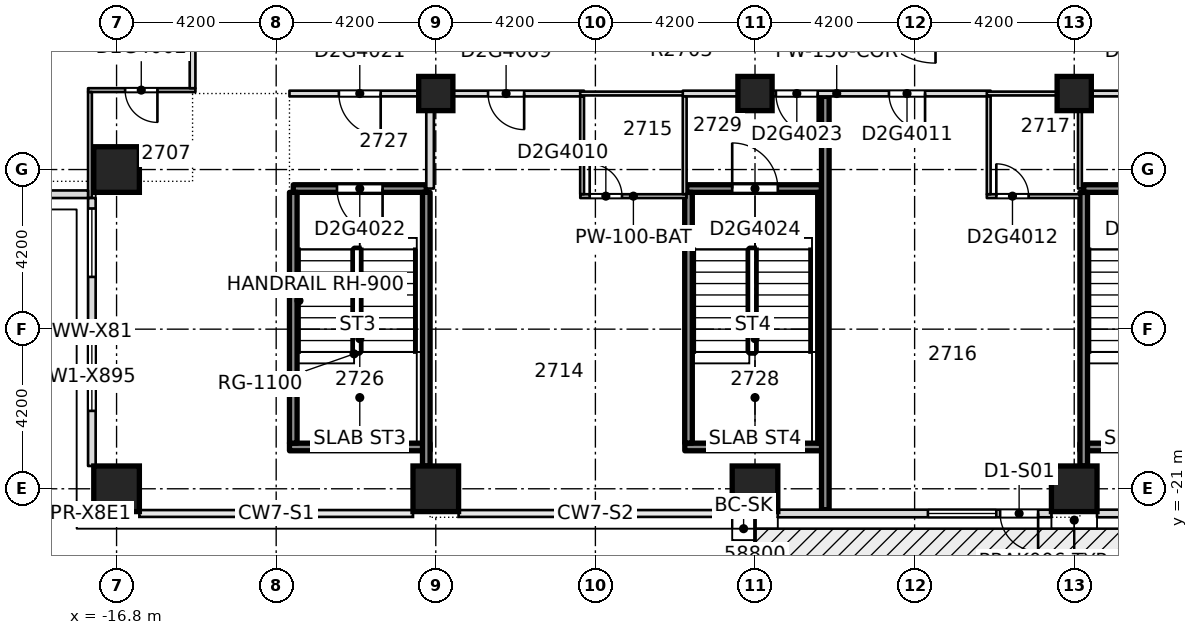
"""IFC4 building model, lengths in metres.
Left out: names, types, materials, properties, quantities, classifications, styles, units other than length and angle.
Written with IfcOpenShell. Run it as: python <this file> out.ifc"""

import sys

from ifc_helpers import new_model, si_unit, direction, frame, frame_2d, origin, origin_2d, place, context, subcontext, project, spatial, rectangle, extrude, element, fill, save


model = new_model("IFC4")
c1 = context("Model", 3, precision=1e-05, world=origin(), true_north=direction((0.0, 1.0)))
c2 = subcontext(c1, "Body", "Model", "MODEL_VIEW")
j1 = project(units=[si_unit("LENGTHUNIT", "METRE"), si_unit("PLANEANGLEUNIT", "RADIAN")], contexts=[c1])
p1 = place(None, origin())
s1 = spatial("IfcSite", under=j1, at=p1, CompositionType="ELEMENT")
p2 = place(p1, origin())
s2 = spatial("IfcBuilding", under=s1, at=p2, CompositionType="ELEMENT")
p3 = place(p2, frame((0.0, 0.0, 108.0)))
s3 = spatial("IfcBuildingStorey", under=s2, at=p3, CompositionType="ELEMENT", Elevation=108.0)
for number, where, z_axis, x_axis in (
    (1, (-16.8, -21.0, -0.32), (0.0, 0.0, 1.0), (1.0, 0.0, 0.0)),
    (2, (-8.4, -21.0, -0.32), (0.0, 0.0, 1.0), (1.0, 0.0, 0.0)),
    (3, (0.0, -21.0, -0.32), (0.0, 0.0, 1.0), (1.0, 0.0, 0.0)),
    (4, (8.4, -21.0, -0.32), (0.0, 0.0, 1.0), (1.0, 0.0, 0.0)),
    (5, (-16.8, -12.6, -0.32), (0.0, 0.0, 1.0), (1.0, 0.0, 0.0)),
):
    element("IfcColumn", number, at=place(p3, frame(where, z_axis=z_axis, x_axis=x_axis)), inside=s3, PredefinedType="COLUMN", context=c2, shape_type="SweptSolid", body=[
        extrude(rectangle(XDim=1.2, YDim=1.2, at=origin_2d()), origin(), (0.0, 0.0, 1.0), 3.45),
    ])
for number, where, z_axis, x_axis in (
    (6, (-8.4, -10.6, -0.32), (0.0, 0.0, 1.0), (1.0, 0.0, 0.0)),
    (7, (0.0, -10.6, -0.32), (0.0, 0.0, 1.0), (1.0, 0.0, 0.0)),
    (8, (8.4, -10.6, -0.32), (0.0, 0.0, 1.0), (1.0, 0.0, 0.0)),
):
    element("IfcColumn", number, at=place(p3, frame(where, z_axis=z_axis, x_axis=x_axis)), inside=s3, PredefinedType="COLUMN", context=c2, shape_type="SweptSolid", body=[
        extrude(rectangle(XDim=0.9, YDim=0.9, at=origin_2d()), origin(), (0.0, 0.0, 1.0), 3.45),
    ])
p4 = place(p3, frame((-1.848, -19.9, 0.0), z_axis=(0.0, 0.0, 1.0), x_axis=(1.0, 0.0, 0.0)))
e9 = element("IfcWall", 9, at=p4, inside=s3, PredefinedType="SOLIDWALL", context=c2, shape_type="SweptSolid", body=[
    extrude(rectangle(XDim=3.696, YDim=0.2, at=frame_2d((1.848, 0.0))), origin(), (0.0, 0.0, 1.0), 3.13),
])
p5 = place(p3, frame((-4.598, -13.3, 0.0), z_axis=(0.0, 0.0, 1.0), x_axis=(1.0, 0.0, 0.0)))
e10 = element("IfcWall", 10, at=p5, inside=s3, PredefinedType="PARTITIONING", context=c2, shape_type="SweptSolid", body=[
    extrude(rectangle(XDim=2.796, YDim=0.1, at=frame_2d((1.398, 0.0))), origin(), (0.0, 0.0, 1.0), 3.13),
])
p6 = place(p5, frame((0.248, 0.0, 0.0)))
e11 = element("IfcOpeningElement", 11, at=p6, cuts=e10, PredefinedType="OPENING", context=c2, shape_type="SweptSolid", body=[
    extrude(rectangle(XDim=0.85, YDim=2.1, at=frame_2d((0.425, 1.05))), frame((0.0, 0.06, 0.0), z_axis=(0.0, -1.0, 0.0), x_axis=(1.0, 0.0, 0.0)), (0.0, 0.0, 1.0), 0.12),
])
p7 = place(p3, frame((6.1, -13.3, 0.0), z_axis=(0.0, 0.0, 1.0), x_axis=(1.0, 0.0, 0.0)))
e12 = element("IfcWall", 12, at=p7, inside=s3, PredefinedType="PARTITIONING", context=c2, shape_type="SweptSolid", body=[
    extrude(rectangle(XDim=2.45, YDim=0.1, at=frame_2d((1.225, 0.0))), origin(), (0.0, 0.0, 1.0), 3.13),
])
p8 = place(p7, frame((0.25, 0.0, 0.0)))
e13 = element("IfcOpeningElement", 13, at=p8, cuts=e12, PredefinedType="OPENING", context=c2, shape_type="SweptSolid", body=[
    extrude(rectangle(XDim=0.85, YDim=2.1, at=frame_2d((0.425, 1.05))), frame((0.0, 0.06, 0.0), z_axis=(0.0, -1.0, 0.0), x_axis=(1.0, 0.0, 0.0)), (0.0, 0.0, 1.0), 0.12),
])
p9 = place(p3, frame((-12.15, -13.1, 0.0), z_axis=(0.0, 0.0, 1.0), x_axis=(1.0, 0.0, 0.0)))
e14 = element("IfcWall", 14, at=p9, inside=s3, PredefinedType="SOLIDWALL", context=c2, shape_type="SweptSolid", body=[
    extrude(rectangle(XDim=3.5, YDim=0.2, at=frame_2d((1.75, 0.0))), origin(), (0.0, 0.0, 1.0), 3.13),
])
p10 = place(p9, frame((1.15, 0.0, 0.0)))
e15 = element("IfcOpeningElement", 15, at=p10, cuts=e14, PredefinedType="OPENING", context=c2, shape_type="SweptSolid", body=[
    extrude(rectangle(XDim=1.2, YDim=2.1, at=frame_2d((0.6, 1.05))), frame((0.0, 0.11, 0.0), z_axis=(0.0, -1.0, 0.0), x_axis=(1.0, 0.0, 0.0)), (0.0, 0.0, 1.0), 0.22),
])
p11 = place(p3, frame((-1.798, -13.1, 0.0), z_axis=(0.0, 0.0, 1.0), x_axis=(1.0, 0.0, 0.0)))
e16 = element("IfcWall", 16, at=p11, inside=s3, PredefinedType="SOLIDWALL", context=c2, shape_type="SweptSolid", body=[
    extrude(rectangle(XDim=3.546, YDim=0.2, at=frame_2d((1.773, 0.0))), origin(), (0.0, 0.0, 1.0), 3.13),
])
p12 = place(p11, frame((1.198, 0.0, 0.0)))
e17 = element("IfcOpeningElement", 17, at=p12, cuts=e16, PredefinedType="OPENING", context=c2, shape_type="SweptSolid", body=[
    extrude(rectangle(XDim=1.2, YDim=2.1, at=frame_2d((0.6, 1.05))), frame((0.0, 0.11, 0.0), z_axis=(0.0, -1.0, 0.0), x_axis=(1.0, 0.0, 0.0)), (0.0, 0.0, 1.0), 0.22),
])
p13 = place(p3, frame((8.65, -13.1, 0.0), z_axis=(0.0, 0.0, 1.0), x_axis=(1.0, 0.0, 0.0)))
e18 = element("IfcWall", 18, at=p13, inside=s3, PredefinedType="SOLIDWALL", context=c2, shape_type="SweptSolid", body=[
    extrude(rectangle(XDim=3.5, YDim=0.2, at=frame_2d((1.75, 0.0))), origin(), (0.0, 0.0, 1.0), 3.13),
])
p14 = place(p13, frame((1.15, 0.0, 0.0)))
e19 = element("IfcOpeningElement", 19, at=p14, cuts=e18, PredefinedType="OPENING", context=c2, shape_type="SweptSolid", body=[
    extrude(rectangle(XDim=1.2, YDim=2.1, at=frame_2d((0.6, 1.05))), frame((0.0, 0.11, 0.0), z_axis=(0.0, -1.0, 0.0), x_axis=(1.0, 0.0, 0.0)), (0.0, 0.0, 1.0), 0.22),
])
p15 = place(p3, frame((-12.25, -10.6, 0.0), z_axis=(0.0, 0.0, 1.0), x_axis=(1.0, 0.0, 0.0)))
e20 = element("IfcWall", 20, at=p15, inside=s3, PredefinedType="PARTITIONING", context=c2, shape_type="SweptSolid", body=[
    extrude(rectangle(XDim=7.75, YDim=0.15, at=frame_2d((3.875, 0.0))), origin(), (0.0, 0.0, 1.0), 3.13),
])
p16 = place(p15, frame((5.225, 0.0, 0.0)))
e21 = element("IfcOpeningElement", 21, at=p16, cuts=e20, PredefinedType="OPENING", context=c2, shape_type="SweptSolid", body=[
    extrude(rectangle(XDim=0.95, YDim=2.1, at=frame_2d((0.475, 1.05))), frame((0.0, 0.085, 0.0), z_axis=(0.0, -1.0, 0.0), x_axis=(1.0, 0.0, 0.0)), (0.0, 0.0, 1.0), 0.17),
])
p17 = place(p15, frame((1.3, 0.0, 0.0)))
e22 = element("IfcOpeningElement", 22, at=p17, cuts=e20, PredefinedType="OPENING", context=c2, shape_type="SweptSolid", body=[
    extrude(rectangle(XDim=1.1, YDim=2.1, at=frame_2d((0.55, 1.05))), frame((0.0, 0.085, 0.0), z_axis=(0.0, -1.0, 0.0), x_axis=(1.0, 0.0, 0.0)), (0.0, 0.0, 1.0), 0.17),
])
p18 = place(p3, frame((-4.6, -10.6, 0.0), z_axis=(0.0, 0.0, 1.0), x_axis=(1.0, 0.0, 0.0)))
e23 = element("IfcWall", 23, at=p18, inside=s3, PredefinedType="PARTITIONING", context=c2, shape_type="SweptSolid", body=[
    extrude(rectangle(XDim=2.8, YDim=0.1, at=frame_2d((1.4, 0.0))), origin(), (0.0, 0.0, 1.0), 3.13),
])
p19 = place(p3, frame((-1.9, -10.6, 0.0), z_axis=(0.0, 0.0, 1.0), x_axis=(1.0, 0.0, 0.0)))
e24 = element("IfcWall", 24, at=p19, inside=s3, PredefinedType="PARTITIONING", context=c2, shape_type="SweptSolid", body=[
    extrude(rectangle(XDim=8.1, YDim=0.15, at=frame_2d((4.05, 0.0))), origin(), (0.0, 0.0, 1.0), 3.13),
])
p20 = place(p19, frame((5.425, 0.0, 0.0)))
e25 = element("IfcOpeningElement", 25, at=p20, cuts=e24, PredefinedType="OPENING", context=c2, shape_type="SweptSolid", body=[
    extrude(rectangle(XDim=0.95, YDim=2.1, at=frame_2d((0.475, 1.05))), frame((0.0, 0.085, 0.0), z_axis=(0.0, -1.0, 0.0), x_axis=(1.0, 0.0, 0.0)), (0.0, 0.0, 1.0), 0.17),
])
p21 = place(p19, frame((2.45, 0.0, 0.0)))
e26 = element("IfcOpeningElement", 26, at=p21, cuts=e24, PredefinedType="OPENING", context=c2, shape_type="SweptSolid", body=[
    extrude(rectangle(XDim=1.1, YDim=2.1, at=frame_2d((0.55, 1.05))), frame((0.0, 0.085, 0.0), z_axis=(0.0, -1.0, 0.0), x_axis=(1.0, 0.0, 0.0)), (0.0, 0.0, 1.0), 0.17),
])
p22 = place(p3, frame((6.1, -10.6, 0.0), z_axis=(0.0, 0.0, 1.0), x_axis=(1.0, 0.0, 0.0)))
e27 = element("IfcWall", 27, at=p22, inside=s3, PredefinedType="PARTITIONING", context=c2, shape_type="SweptSolid", body=[
    extrude(rectangle(XDim=2.5, YDim=0.1, at=frame_2d((1.25, 0.0))), origin(), (0.0, 0.0, 1.0), 3.13),
])
p23 = place(p3, frame((8.5, -10.6, 0.0), z_axis=(0.0, 0.0, 1.0), x_axis=(1.0, 0.0, 0.0)))
e28 = element("IfcWall", 28, at=p23, inside=s3, PredefinedType="PARTITIONING", context=c2, shape_type="SweptSolid", body=[
    extrude(rectangle(XDim=3.75, YDim=0.15, at=frame_2d((1.875, 0.0))), origin(), (0.0, 0.0, 1.0), 3.13),
])
p24 = place(p23, frame((1.35, 0.0, 0.0)))
e29 = element("IfcOpeningElement", 29, at=p24, cuts=e28, PredefinedType="OPENING", context=c2, shape_type="SweptSolid", body=[
    extrude(rectangle(XDim=1.1, YDim=2.1, at=frame_2d((0.55, 1.05))), frame((0.0, 0.085, 0.0), z_axis=(0.0, -1.0, 0.0), x_axis=(1.0, 0.0, 0.0)), (0.0, 0.0, 1.0), 0.17),
])
p25 = place(p3, frame((-17.55, -10.51, 0.0), z_axis=(0.0, 0.0, 1.0), x_axis=(1.0, 0.0, 0.0)))
e30 = element("IfcWall", 30, at=p25, inside=s3, PredefinedType="PARTITIONING", context=c2, shape_type="SweptSolid", body=[
    extrude(rectangle(XDim=2.825, YDim=0.1, at=frame_2d((1.413, 0.0))), origin(), (0.0, 0.0, 1.0), 3.13),
])
p26 = place(p25, frame((0.975, 0.0, 0.0)))
e31 = element("IfcOpeningElement", 31, at=p26, cuts=e30, PredefinedType="OPENING", context=c2, shape_type="SweptSolid", body=[
    extrude(rectangle(XDim=0.85, YDim=2.1, at=frame_2d((0.425, 1.05))), frame((0.0, 0.06, 0.0), z_axis=(0.0, -1.0, 0.0), x_axis=(1.0, 0.0, 0.0)), (0.0, 0.0, 1.0), 0.12),
])
p27 = place(p3, frame((-17.5, -13.35, 0.0), z_axis=(0.0, 0.0, 1.0), x_axis=(0.0, 1.0, 0.0)))
e32 = element("IfcWall", 32, at=p27, inside=s3, PredefinedType="PARTITIONING", context=c2, shape_type="SweptSolid", body=[
    extrude(rectangle(XDim=2.79, YDim=0.1, at=frame_2d((1.395, 0.0))), origin(), (0.0, 0.0, 1.0), 3.13),
])
p28 = place(p3, frame((-14.8, -10.46, 0.0), z_axis=(0.0, 0.0, 1.0), x_axis=(0.0, 1.0, 0.0)))
e33 = element("IfcWall", 33, at=p28, inside=s3, PredefinedType="PARTITIONING", context=c2, shape_type="SweptSolid", body=[
    extrude(rectangle(XDim=2.985, YDim=0.15, at=frame_2d((1.492, 0.0))), origin(), (0.0, 0.0, 1.0), 3.13),
])
p29 = place(p3, frame((-8.55, -13.1, 0.0), z_axis=(0.0, 0.0, 1.0), x_axis=(0.0, 1.0, 0.0)))
e34 = element("IfcWall", 34, at=p29, inside=s3, PredefinedType="PARTITIONING", context=c2, shape_type="SweptSolid", body=[
    extrude(rectangle(XDim=2.425, YDim=0.2, at=frame_2d((1.212, 0.0))), origin(), (0.0, 0.0, 1.0), 3.13),
])
for number, where, z_axis, x_axis in (
    (35, (-4.55, -13.248, 0.0), (0.0, 0.0, 1.0), (0.0, 1.0, 0.0)),
    (36, (-1.85, -13.248, 0.0), (0.0, 0.0, 1.0), (0.0, 1.0, 0.0)),
):
    element("IfcWall", number, at=place(p3, frame(where, z_axis=z_axis, x_axis=x_axis)), inside=s3, PredefinedType="PARTITIONING", context=c2, shape_type="SweptSolid", body=[
        extrude(rectangle(XDim=2.573, YDim=0.1, at=frame_2d((1.287, 0.0))), origin(), (0.0, 0.0, 1.0), 3.13),
    ])
for number, where, z_axis, x_axis in (
    (37, (-1.75, -19.798, 0.0), (0.0, 0.0, 1.0), (0.0, 1.0, 0.0)),
    (38, (1.75, -19.798, 0.0), (0.0, 0.0, 1.0), (0.0, 1.0, 0.0)),
):
    element("IfcWall", number, at=place(p3, frame(where, z_axis=z_axis, x_axis=x_axis)), inside=s3, PredefinedType="SOLIDWALL", context=c2, shape_type="SweptSolid", body=[
        extrude(rectangle(XDim=6.596, YDim=0.2, at=frame_2d((3.298, 0.0))), origin(), (0.0, 0.0, 1.0), 3.13),
    ])
p30 = place(p3, frame((6.15, -13.25, 0.0), z_axis=(0.0, 0.0, 1.0), x_axis=(0.0, 1.0, 0.0)))
e39 = element("IfcWall", 39, at=p30, inside=s3, PredefinedType="PARTITIONING", context=c2, shape_type="SweptSolid", body=[
    extrude(rectangle(XDim=2.575, YDim=0.1, at=frame_2d((1.288, 0.0))), origin(), (0.0, 0.0, 1.0), 3.13),
])
p31 = place(p3, frame((8.55, -13.1, 0.0), z_axis=(0.0, 0.0, 1.0), x_axis=(0.0, 1.0, 0.0)))
e40 = element("IfcWall", 40, at=p31, inside=s3, PredefinedType="PARTITIONING", context=c2, shape_type="SweptSolid", body=[
    extrude(rectangle(XDim=2.425, YDim=0.1, at=frame_2d((1.212, 0.0))), origin(), (0.0, 0.0, 1.0), 3.13),
])
p32 = place(p3, frame((0.6, -21.65, 0.0), z_axis=(0.0, 0.0, 1.0), x_axis=(1.0, 0.0, 0.0)))
e41 = element("IfcWall", 41, at=p32, inside=s3, PredefinedType="STANDARD", context=c2, shape_type="SweptSolid", body=[
    extrude(rectangle(XDim=7.2, YDim=0.2, at=frame_2d((3.6, 0.0))), origin(), (0.0, 0.0, 1.0), 3.13),
])
p33 = place(p32, frame((3.95, 0.0, 0.2)))
e42 = element("IfcOpeningElement", 42, at=p33, cuts=e41, PredefinedType="OPENING", context=c2, shape_type="SweptSolid", body=[
    extrude(rectangle(XDim=1.8, YDim=2.65, at=frame_2d((0.9, 1.325))), frame((0.0, 0.11, 0.0), z_axis=(0.0, -1.0, 0.0), x_axis=(1.0, 0.0, 0.0)), (0.0, 0.0, 1.0), 0.22),
])
p34 = place(p32, frame((5.85, 0.0, 0.0)))
e43 = element("IfcOpeningElement", 43, at=p34, cuts=e41, PredefinedType="OPENING", context=c2, shape_type="SweptSolid", body=[
    extrude(rectangle(XDim=1.0, YDim=2.4, at=frame_2d((0.5, 1.2))), frame((0.0, 0.11, 0.0), z_axis=(0.0, -1.0, 0.0), x_axis=(1.0, 0.0, 0.0)), (0.0, 0.0, 1.0), 0.22),
])
p35 = place(p3, frame((9.0, -21.65, 0.0), z_axis=(0.0, 0.0, 1.0), x_axis=(1.0, 0.0, 0.0)))
e44 = element("IfcWall", 44, at=p35, inside=s3, PredefinedType="STANDARD", context=c2, shape_type="SweptSolid", body=[
    extrude(rectangle(XDim=7.2, YDim=0.2, at=frame_2d((3.6, 0.0))), origin(), (0.0, 0.0, 1.0), 3.13),
])
p36 = place(p35, frame((3.95, 0.0, 0.2)))
e45 = element("IfcOpeningElement", 45, at=p36, cuts=e44, PredefinedType="OPENING", context=c2, shape_type="SweptSolid", body=[
    extrude(rectangle(XDim=1.8, YDim=2.65, at=frame_2d((0.9, 1.325))), frame((0.0, 0.11, 0.0), z_axis=(0.0, -1.0, 0.0), x_axis=(1.0, 0.0, 0.0)), (0.0, 0.0, 1.0), 0.22),
])
p37 = place(p35, frame((5.85, 0.0, 0.0)))
e46 = element("IfcOpeningElement", 46, at=p37, cuts=e44, PredefinedType="OPENING", context=c2, shape_type="SweptSolid", body=[
    extrude(rectangle(XDim=1.0, YDim=2.4, at=frame_2d((0.5, 1.2))), frame((0.0, 0.11, 0.0), z_axis=(0.0, -1.0, 0.0), x_axis=(1.0, 0.0, 0.0)), (0.0, 0.0, 1.0), 0.22),
])
p38 = place(p3, frame((-24.6, -13.25, 0.0), z_axis=(0.0, 0.0, 1.0), x_axis=(1.0, 0.0, 0.0)))
e47 = element("IfcWall", 47, at=p38, inside=s3, PredefinedType="STANDARD", context=c2, shape_type="SweptSolid", body=[
    extrude(rectangle(XDim=7.05, YDim=0.2, at=frame_2d((3.525, 0.0))), origin(), (0.0, 0.0, 1.0), 3.13),
])
p39 = place(p3, frame((-17.45, -13.35, 0.0), z_axis=(0.0, 0.0, 1.0), x_axis=(0.0, -1.0, 0.0)))
e48 = element("IfcWall", 48, at=p39, inside=s3, PredefinedType="STANDARD", context=c2, shape_type="SweptSolid", body=[
    extrude(rectangle(XDim=7.05, YDim=0.2, at=frame_2d((3.525, 0.0))), origin(), (0.0, 0.0, 1.0), 3.13),
])
p40 = place(p39, frame((3.8, 0.0, 0.2)))
e49 = element("IfcOpeningElement", 49, at=p40, cuts=e48, PredefinedType="OPENING", context=c2, shape_type="SweptSolid", body=[
    extrude(rectangle(XDim=1.8, YDim=2.65, at=frame_2d((0.9, 1.325))), frame((0.0, 0.11, 0.0), z_axis=(0.0, -1.0, 0.0), x_axis=(1.0, 0.0, 0.0)), (0.0, 0.0, 1.0), 0.22),
])
p41 = place(p39, frame((0.275, 0.0, 0.2)))
e50 = element("IfcOpeningElement", 50, at=p41, cuts=e48, PredefinedType="OPENING", context=c2, shape_type="SweptSolid", body=[
    extrude(rectangle(XDim=1.8, YDim=2.65, at=frame_2d((0.9, 1.325))), frame((0.0, 0.11, 0.0), z_axis=(0.0, -1.0, 0.0), x_axis=(1.0, 0.0, 0.0)), (0.0, 0.0, 1.0), 0.22),
])
p42 = place(p3, frame((-12.25, -19.9, 0.0), z_axis=(0.0, 0.0, 1.0), x_axis=(1.0, 0.0, 0.0)))
e51 = element("IfcWall", 51, at=p42, inside=s3, PredefinedType="SOLIDWALL", context=c2, shape_type="SweptSolid", body=[
    extrude(rectangle(XDim=3.7, YDim=0.2, at=frame_2d((1.85, 0.0))), origin(), (0.0, 0.0, 1.0), 3.13),
])
p43 = place(p3, frame((-12.15, -19.8, 0.0), z_axis=(0.0, 0.0, 1.0), x_axis=(0.0, 1.0, 0.0)))
e52 = element("IfcWall", 52, at=p43, inside=s3, PredefinedType="SOLIDWALL", context=c2, shape_type="SweptSolid", body=[
    extrude(rectangle(XDim=6.6, YDim=0.2, at=frame_2d((3.3, 0.0))), origin(), (0.0, 0.0, 1.0), 3.13),
])
p44 = place(p3, frame((-8.65, -20.4, 0.0), z_axis=(0.0, 0.0, 1.0), x_axis=(0.0, 1.0, 0.0)))
e53 = element("IfcWall", 53, at=p44, inside=s3, PredefinedType="SOLIDWALL", context=c2, shape_type="SweptSolid", body=[
    extrude(rectangle(XDim=7.2, YDim=0.2, at=frame_2d((3.6, 0.0))), origin(), (0.0, 0.0, 1.0), 3.13),
])
p45 = place(p3, frame((8.55, -19.9, 0.0), z_axis=(0.0, 0.0, 1.0), x_axis=(1.0, 0.0, 0.0)))
e54 = element("IfcWall", 54, at=p45, inside=s3, PredefinedType="SOLIDWALL", context=c2, shape_type="SweptSolid", body=[
    extrude(rectangle(XDim=3.7, YDim=0.2, at=frame_2d((1.85, 0.0))), origin(), (0.0, 0.0, 1.0), 3.13),
])
p46 = place(p3, frame((8.65, -20.4, 0.0), z_axis=(0.0, 0.0, 1.0), x_axis=(0.0, 1.0, 0.0)))
e55 = element("IfcWall", 55, at=p46, inside=s3, PredefinedType="SOLIDWALL", context=c2, shape_type="SweptSolid", body=[
    extrude(rectangle(XDim=7.198, YDim=0.2, at=frame_2d((3.599, 0.0))), origin(), (0.0, 0.0, 1.0), 3.13),
])
p47 = place(p3, frame((1.85, -21.55, 0.0), z_axis=(0.0, 0.0, 1.0), x_axis=(0.0, 1.0, 0.0)))
e56 = element("IfcWall", 56, at=p47, inside=s3, PredefinedType="SOLIDWALL", context=c2, shape_type="SweptSolid", body=[
    extrude(rectangle(XDim=10.875, YDim=0.2, at=frame_2d((5.438, 0.0))), origin(), (0.0, 0.0, 1.0), 3.13),
])
p48 = place(p26, origin())
e57 = element("IfcDoor", 57, at=p48, inside=s3, OperationType="SINGLE_SWING_RIGHT", PredefinedType="DOOR", context=c2, shape_type="SweptSolid", body=[
    extrude(rectangle(XDim=0.85, YDim=2.1, at=frame_2d((0.425, 1.05))), frame((0.0, 0.025, 0.0), z_axis=(0.0, -1.0, 0.0), x_axis=(1.0, 0.0, 0.0)), (0.0, 0.0, 1.0), 0.05),
])
fill(e31, e57)
p49 = place(p16, origin())
e58 = element("IfcDoor", 58, at=p49, inside=s3, OperationType="SINGLE_SWING_LEFT", PredefinedType="DOOR", context=c2, shape_type="SweptSolid", body=[
    extrude(rectangle(XDim=0.95, YDim=2.1, at=frame_2d((0.475, 1.05))), frame((0.0, 0.025, 0.0), z_axis=(0.0, -1.0, 0.0), x_axis=(1.0, 0.0, 0.0)), (0.0, 0.0, 1.0), 0.05),
])
fill(e21, e58)
p50 = place(p6, origin())
e59 = element("IfcDoor", 59, at=p50, inside=s3, OperationType="SINGLE_SWING_LEFT", PredefinedType="DOOR", context=c2, shape_type="SweptSolid", body=[
    extrude(rectangle(XDim=0.85, YDim=2.1, at=frame_2d((0.425, 1.05))), frame((0.0, 0.025, 0.0), z_axis=(0.0, -1.0, 0.0), x_axis=(1.0, 0.0, 0.0)), (0.0, 0.0, 1.0), 0.05),
])
fill(e11, e59)
p51 = place(p20, origin())
e60 = element("IfcDoor", 60, at=p51, inside=s3, OperationType="SINGLE_SWING_LEFT", PredefinedType="DOOR", context=c2, shape_type="SweptSolid", body=[
    extrude(rectangle(XDim=0.95, YDim=2.1, at=frame_2d((0.475, 1.05))), frame((0.0, 0.025, 0.0), z_axis=(0.0, -1.0, 0.0), x_axis=(1.0, 0.0, 0.0)), (0.0, 0.0, 1.0), 0.05),
])
fill(e25, e60)
p52 = place(p8, origin())
e61 = element("IfcDoor", 61, at=p52, inside=s3, OperationType="SINGLE_SWING_LEFT", PredefinedType="DOOR", context=c2, shape_type="SweptSolid", body=[
    extrude(rectangle(XDim=0.85, YDim=2.1, at=frame_2d((0.425, 1.05))), frame((0.0, 0.025, 0.0), z_axis=(0.0, -1.0, 0.0), x_axis=(1.0, 0.0, 0.0)), (0.0, 0.0, 1.0), 0.05),
])
fill(e13, e61)
p53 = place(p17, origin())
e62 = element("IfcDoor", 62, at=p53, inside=s3, OperationType="SINGLE_SWING_RIGHT", PredefinedType="DOOR", context=c2, shape_type="SweptSolid", body=[
    extrude(rectangle(XDim=1.1, YDim=2.1, at=frame_2d((0.55, 1.05))), frame((0.0, 0.025, 0.0), z_axis=(0.0, -1.0, 0.0), x_axis=(1.0, 0.0, 0.0)), (0.0, 0.0, 1.0), 0.05),
])
fill(e22, e62)
p54 = place(p10, origin())
e63 = element("IfcDoor", 63, at=p54, inside=s3, OperationType="SINGLE_SWING_RIGHT", PredefinedType="DOOR", context=c2, shape_type="SweptSolid", body=[
    extrude(rectangle(XDim=1.2, YDim=2.1, at=frame_2d((0.6, 1.05))), frame((0.0, 0.025, 0.0), z_axis=(0.0, -1.0, 0.0), x_axis=(1.0, 0.0, 0.0)), (0.0, 0.0, 1.0), 0.05),
])
fill(e15, e63)
p55 = place(p21, origin())
e64 = element("IfcDoor", 64, at=p55, inside=s3, OperationType="SINGLE_SWING_LEFT", PredefinedType="DOOR", context=c2, shape_type="SweptSolid", body=[
    extrude(rectangle(XDim=1.1, YDim=2.1, at=frame_2d((0.55, 1.05))), frame((0.0, 0.025, 0.0), z_axis=(0.0, -1.0, 0.0), x_axis=(1.0, 0.0, 0.0)), (0.0, 0.0, 1.0), 0.05),
])
fill(e26, e64)
p56 = place(p12, origin())
e65 = element("IfcDoor", 65, at=p56, inside=s3, OperationType="SINGLE_SWING_RIGHT", PredefinedType="DOOR", context=c2, shape_type="SweptSolid", body=[
    extrude(rectangle(XDim=1.2, YDim=2.1, at=frame_2d((0.6, 1.05))), frame((0.0, 0.025, 0.0), z_axis=(0.0, -1.0, 0.0), x_axis=(1.0, 0.0, 0.0)), (0.0, 0.0, 1.0), 0.05),
])
fill(e17, e65)
p57 = place(p33, origin())
e66 = element("IfcWindow", 66, at=p57, inside=s3, PartitioningType="SINGLE_PANEL", PredefinedType="WINDOW", context=c2, shape_type="SweptSolid", body=[
    extrude(rectangle(XDim=1.8, YDim=2.65, at=frame_2d((0.9, 1.325))), frame((0.0, 0.03, 0.0), z_axis=(0.0, -1.0, 0.0), x_axis=(1.0, 0.0, 0.0)), (0.0, 0.0, 1.0), 0.06),
])
fill(e42, e66)
p58 = place(p34, origin())
e67 = element("IfcDoor", 67, at=p58, inside=s3, OperationType="SINGLE_SWING_LEFT", PredefinedType="DOOR", context=c2, shape_type="SweptSolid", body=[
    extrude(rectangle(XDim=1.0, YDim=2.4, at=frame_2d((0.5, 1.2))), frame((0.0, 0.025, 0.0), z_axis=(0.0, -1.0, 0.0), x_axis=(1.0, 0.0, 0.0)), (0.0, 0.0, 1.0), 0.05),
])
fill(e43, e67)
p59 = place(p40, origin())
e68 = element("IfcWindow", 68, at=p59, inside=s3, PartitioningType="SINGLE_PANEL", PredefinedType="WINDOW", context=c2, shape_type="SweptSolid", body=[
    extrude(rectangle(XDim=1.8, YDim=2.65, at=frame_2d((0.9, 1.325))), frame((0.0, 0.03, 0.0), z_axis=(0.0, -1.0, 0.0), x_axis=(1.0, 0.0, 0.0)), (0.0, 0.0, 1.0), 0.06),
])
fill(e49, e68)
p60 = place(p41, origin())
e69 = element("IfcWindow", 69, at=p60, inside=s3, PartitioningType="SINGLE_PANEL", PredefinedType="WINDOW", context=c2, shape_type="SweptSolid", body=[
    extrude(rectangle(XDim=1.8, YDim=2.65, at=frame_2d((0.9, 1.325))), frame((0.0, 0.03, 0.0), z_axis=(0.0, -1.0, 0.0), x_axis=(1.0, 0.0, 0.0)), (0.0, 0.0, 1.0), 0.06),
])
fill(e50, e69)
save(model, sys.argv[1])
